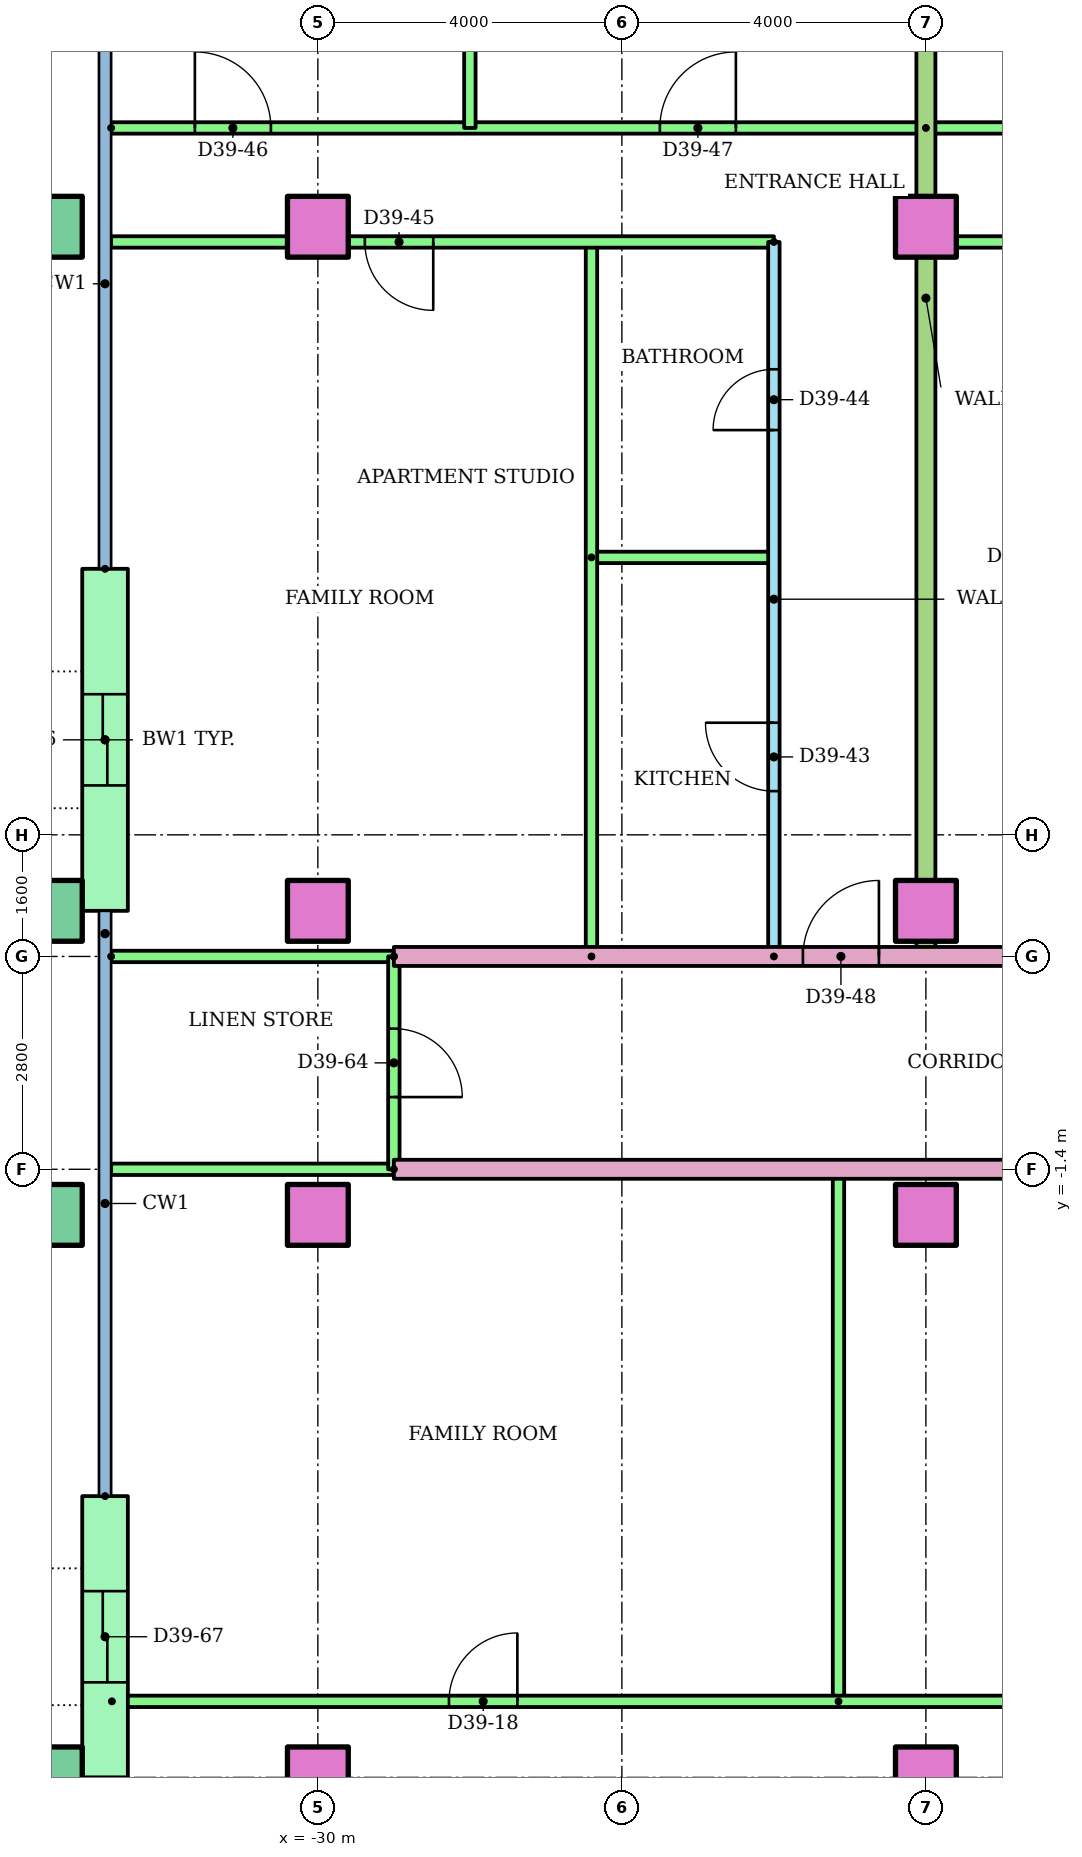
"""IFC4 building model, lengths in metres.
Left out: names, types, materials, properties, quantities, classifications, styles, units other than length and angle.
Written with IfcOpenShell. Run it as: python <this file> out.ifc"""

import sys

from ifc_helpers import new_model, si_unit, direction, frame, frame_2d, origin, origin_2d, place, context, subcontext, project, spatial, rectangle, hollow_rectangle, extrude, element, fill, save


model = new_model("IFC4")
c1 = context("Model", 3, precision=1e-05, world=origin(), true_north=direction((0.0, 1.0)))
c2 = subcontext(c1, "Body", "Model", "MODEL_VIEW")
j1 = project(units=[si_unit("LENGTHUNIT", "METRE"), si_unit("PLANEANGLEUNIT", "RADIAN")], contexts=[c1])
p1 = place(None, origin())
s1 = spatial("IfcSite", under=j1, at=p1, CompositionType="ELEMENT")
p2 = place(p1, origin())
s2 = spatial("IfcBuilding", under=s1, at=p2, CompositionType="ELEMENT")
p3 = place(p2, frame((0.0, 0.0, 148.6)))
s3 = spatial("IfcBuildingStorey", under=s2, at=p3, CompositionType="ELEMENT", Elevation=148.6)
p4 = place(p3, frame((-33.5, -9.4, 0.0)))
e1 = element("IfcColumn", 1, at=p4, inside=s3, PredefinedType="COLUMN", context=c2, shape_type="SweptSolid", body=[
    extrude(hollow_rectangle(XDim=0.8, YDim=0.8, WallThickness=0.04, at=origin_2d()), origin(), (0.0, 0.0, 1.0), 3.2),
])
for number, where in (
    (2, (-30.0, -9.4, 0.0)),
    (3, (-22.0, -9.4, 0.0)),
):
    element("IfcColumn", number, at=place(p3, frame(where)), inside=s3, PredefinedType="COLUMN", context=c2, shape_type="SweptSolid", body=[
        extrude(rectangle(XDim=0.8, YDim=0.8, at=origin_2d()), origin(), (0.0, 0.0, 1.0), 3.2),
    ])
p5 = place(p3, frame((-33.5, -2.0, 0.0)))
e4 = element("IfcColumn", 4, at=p5, inside=s3, PredefinedType="COLUMN", context=c2, shape_type="SweptSolid", body=[
    extrude(hollow_rectangle(XDim=0.8, YDim=0.8, WallThickness=0.04, at=origin_2d()), origin(), (0.0, 0.0, 1.0), 3.2),
])
for number, where in (
    (5, (-30.0, -2.0, 0.0)),
    (6, (-22.0, -2.0, 0.0)),
):
    element("IfcColumn", number, at=place(p3, frame(where)), inside=s3, PredefinedType="COLUMN", context=c2, shape_type="SweptSolid", body=[
        extrude(rectangle(XDim=0.8, YDim=0.8, at=origin_2d()), origin(), (0.0, 0.0, 1.0), 3.2),
    ])
p6 = place(p3, frame((-33.5, 2.0, 0.0)))
e7 = element("IfcColumn", 7, at=p6, inside=s3, PredefinedType="COLUMN", context=c2, shape_type="SweptSolid", body=[
    extrude(hollow_rectangle(XDim=0.8, YDim=0.8, WallThickness=0.04, at=origin_2d()), origin(), (0.0, 0.0, 1.0), 3.2),
])
for number, where in (
    (8, (-30.0, 2.0, 0.0)),
    (9, (-22.0, 2.0, 0.0)),
):
    element("IfcColumn", number, at=place(p3, frame(where)), inside=s3, PredefinedType="COLUMN", context=c2, shape_type="SweptSolid", body=[
        extrude(rectangle(XDim=0.8, YDim=0.8, at=origin_2d()), origin(), (0.0, 0.0, 1.0), 3.2),
    ])
p7 = place(p3, frame((-33.5, 11.0, 0.0)))
e10 = element("IfcColumn", 10, at=p7, inside=s3, PredefinedType="COLUMN", context=c2, shape_type="SweptSolid", body=[
    extrude(hollow_rectangle(XDim=0.8, YDim=0.8, WallThickness=0.04, at=origin_2d()), origin(), (0.0, 0.0, 1.0), 3.2),
])
for number, where in (
    (11, (-30.0, 11.0, 0.0)),
    (12, (-22.0, 11.0, 0.0)),
):
    element("IfcColumn", number, at=place(p3, frame(where)), inside=s3, PredefinedType="COLUMN", context=c2, shape_type="SweptSolid", body=[
        extrude(rectangle(XDim=0.8, YDim=0.8, at=origin_2d()), origin(), (0.0, 0.0, 1.0), 3.2),
    ])
p8 = place(p3, frame((-32.8, 6.5, 0.0), z_axis=(0.0, 0.0, 1.0), x_axis=(0.0, -1.0, 0.0)))
e13 = element("IfcWall", 13, at=p8, inside=s3, PredefinedType="STANDARD", context=c2, shape_type="SweptSolid", body=[
    extrude(rectangle(XDim=4.5, YDim=0.6, at=frame_2d((2.25, 0.0))), origin(), (0.0, 0.0, 1.0), 2.8),
])
p9 = place(p8, frame((1.65, 0.0, 0.0)))
e14 = element("IfcOpeningElement", 14, at=p9, cuts=e13, PredefinedType="OPENING", context=c2, shape_type="SweptSolid", body=[
    extrude(rectangle(XDim=1.2, YDim=2.1, at=frame_2d((0.6, 1.05))), frame((0.0, 0.31, 0.0), z_axis=(0.0, -1.0, 0.0), x_axis=(1.0, 0.0, 0.0)), (0.0, 0.0, 1.0), 0.62),
])
p10 = place(p3, frame((-32.8, -5.7, 0.0), z_axis=(0.0, 0.0, 1.0), x_axis=(0.0, -1.0, 0.0)))
e15 = element("IfcWall", 15, at=p10, inside=s3, PredefinedType="STANDARD", context=c2, shape_type="SweptSolid", body=[
    extrude(rectangle(XDim=3.7, YDim=0.6, at=frame_2d((1.85, 0.0))), origin(), (0.0, 0.0, 1.0), 2.8),
])
p11 = place(p10, frame((1.25, 0.0, 0.0)))
e16 = element("IfcOpeningElement", 16, at=p11, cuts=e15, PredefinedType="OPENING", context=c2, shape_type="SweptSolid", body=[
    extrude(rectangle(XDim=1.2, YDim=2.1, at=frame_2d((0.6, 1.05))), frame((0.0, 0.31, 0.0), z_axis=(0.0, -1.0, 0.0), x_axis=(1.0, 0.0, 0.0)), (0.0, 0.0, 1.0), 0.62),
])
p12 = place(p3, frame((-23.15, -8.4, 0.0), z_axis=(0.0, 0.0, 1.0), x_axis=(0.0, 1.0, 0.0)))
e17 = element("IfcWall", 17, at=p12, inside=s3, PredefinedType="PARTITIONING", context=c2, shape_type="SweptSolid", body=[
    extrude(rectangle(XDim=7.0, YDim=0.15, at=frame_2d((3.5, 0.0))), origin(), (0.0, 0.0, 1.0), 2.4),
])
p13 = place(p3, frame((-32.71, -8.4, 0.0)))
e18 = element("IfcWall", 18, at=p13, inside=s3, PredefinedType="PARTITIONING", context=c2, shape_type="SweptSolid", body=[
    extrude(rectangle(XDim=24.71, YDim=0.15, at=frame_2d((12.355, 0.0))), origin(), (0.0, 0.0, 1.0), 2.4),
])
p14 = place(p13, frame((19.328, 0.0, 0.0)))
e19 = element("IfcOpeningElement", 19, at=p14, cuts=e18, PredefinedType="OPENING", context=c2, shape_type="SweptSolid", body=[
    extrude(rectangle(XDim=0.9, YDim=2.1, at=frame_2d((0.45, 1.05))), frame((0.0, 0.085, 0.0), z_axis=(0.0, -1.0, 0.0), x_axis=(1.0, 0.0, 0.0)), (0.0, 0.0, 1.0), 0.17),
])
p15 = place(p13, frame((12.735, 0.0, 0.0)))
e20 = element("IfcOpeningElement", 20, at=p15, cuts=e18, PredefinedType="OPENING", context=c2, shape_type="SweptSolid", body=[
    extrude(rectangle(XDim=0.9, YDim=2.1, at=frame_2d((0.45, 1.05))), frame((0.0, 0.085, 0.0), z_axis=(0.0, -1.0, 0.0), x_axis=(1.0, 0.0, 0.0)), (0.0, 0.0, 1.0), 0.17),
])
p16 = place(p13, frame((4.435, 0.0, 0.0)))
e21 = element("IfcOpeningElement", 21, at=p16, cuts=e18, PredefinedType="OPENING", context=c2, shape_type="SweptSolid", body=[
    extrude(rectangle(XDim=0.9, YDim=2.1, at=frame_2d((0.45, 1.05))), frame((0.0, 0.085, 0.0), z_axis=(0.0, -1.0, 0.0), x_axis=(1.0, 0.0, 0.0)), (0.0, 0.0, 1.0), 0.17),
])
p17 = place(p3, frame((-14.0, -1.4, 0.0), z_axis=(0.0, 0.0, 1.0), x_axis=(-1.0, 0.0, 0.0)))
e22 = element("IfcWall", 22, at=p17, inside=s3, PredefinedType="PARTITIONING", context=c2, shape_type="SweptSolid", body=[
    extrude(rectangle(XDim=15.0, YDim=0.25, at=frame_2d((7.5, 0.0))), origin(), (0.0, 0.0, 1.0), 2.4),
])
p18 = place(p3, frame((-29.0, -1.4, 0.0), z_axis=(0.0, 0.0, 1.0), x_axis=(-1.0, 0.0, 0.0)))
e23 = element("IfcWall", 23, at=p18, inside=s3, PredefinedType="PARTITIONING", context=c2, shape_type="SweptSolid", body=[
    extrude(rectangle(XDim=3.72, YDim=0.15, at=frame_2d((1.86, 0.0))), origin(), (0.0, 0.0, 1.0), 2.4),
])
p19 = place(p3, frame((-24.0, 1.4, 0.0), z_axis=(0.0, 0.0, 1.0), x_axis=(0.0, 1.0, 0.0)))
e24 = element("IfcWall", 24, at=p19, inside=s3, PredefinedType="PARTITIONING", context=c2, shape_type="SweptSolid", body=[
    extrude(rectangle(XDim=9.4, YDim=0.15, at=frame_2d((4.7, 0.0))), origin(), (0.0, 0.0, 1.0), 2.4),
])
p20 = place(p19, frame((2.175, 0.0, 0.0)))
e25 = element("IfcOpeningElement", 25, at=p20, cuts=e24, PredefinedType="OPENING", context=c2, shape_type="SweptSolid", body=[
    extrude(rectangle(XDim=0.9, YDim=2.1, at=frame_2d((0.45, 1.05))), frame((0.0, 0.085, 0.0), z_axis=(0.0, -1.0, 0.0), x_axis=(1.0, 0.0, 0.0)), (0.0, 0.0, 1.0), 0.17),
])
p21 = place(p19, frame((6.925, 0.0, 0.0)))
e26 = element("IfcOpeningElement", 26, at=p21, cuts=e24, PredefinedType="OPENING", context=c2, shape_type="SweptSolid", body=[
    extrude(rectangle(XDim=0.8, YDim=2.1, at=frame_2d((0.4, 1.05))), frame((0.0, 0.085, 0.0), z_axis=(0.0, -1.0, 0.0), x_axis=(1.0, 0.0, 0.0)), (0.0, 0.0, 1.0), 0.17),
])
p22 = place(p3, frame((-26.4, 6.65, 0.0)))
e27 = element("IfcWall", 27, at=p22, inside=s3, PredefinedType="PARTITIONING", context=c2, shape_type="SweptSolid", body=[
    extrude(rectangle(XDim=2.4, YDim=0.15, at=frame_2d((1.2, 0.0))), origin(), (0.0, 0.0, 1.0), 2.4),
])
p23 = place(p3, frame((-26.4, 1.4, 0.0), z_axis=(0.0, 0.0, 1.0), x_axis=(0.0, 1.0, 0.0)))
e28 = element("IfcWall", 28, at=p23, inside=s3, PredefinedType="PARTITIONING", context=c2, shape_type="SweptSolid", body=[
    extrude(rectangle(XDim=9.4, YDim=0.15, at=frame_2d((4.7, 0.0))), origin(), (0.0, 0.0, 1.0), 2.4),
])
p24 = place(p3, frame((-24.0, 10.8, 0.0), z_axis=(0.0, 0.0, 1.0), x_axis=(-1.0, 0.0, 0.0)))
e29 = element("IfcWall", 29, at=p24, inside=s3, PredefinedType="PARTITIONING", context=c2, shape_type="SweptSolid", body=[
    extrude(rectangle(XDim=8.72, YDim=0.15, at=frame_2d((4.36, 0.0))), origin(), (0.0, 0.0, 1.0), 2.4),
])
p25 = place(p24, frame((4.482, 0.0, 0.0)))
e30 = element("IfcOpeningElement", 30, at=p25, cuts=e29, PredefinedType="OPENING", context=c2, shape_type="SweptSolid", body=[
    extrude(rectangle(XDim=0.9, YDim=2.1, at=frame_2d((0.45, 1.05))), frame((0.0, 0.085, 0.0), z_axis=(0.0, -1.0, 0.0), x_axis=(1.0, 0.0, 0.0)), (0.0, 0.0, 1.0), 0.17),
])
p26 = place(p3, frame((-32.72, 12.3, 0.0)))
e31 = element("IfcWall", 31, at=p26, inside=s3, PredefinedType="PARTITIONING", context=c2, shape_type="SweptSolid", body=[
    extrude(rectangle(XDim=10.72, YDim=0.15, at=frame_2d((5.36, 0.0))), origin(), (0.0, 0.0, 1.0), 2.4),
])
p27 = place(p26, frame((1.102, 0.0, 0.0)))
e32 = element("IfcOpeningElement", 32, at=p27, cuts=e31, PredefinedType="OPENING", context=c2, shape_type="SweptSolid", body=[
    extrude(rectangle(XDim=1.0, YDim=2.1, at=frame_2d((0.5, 1.05))), frame((0.0, 0.085, 0.0), z_axis=(0.0, -1.0, 0.0), x_axis=(1.0, 0.0, 0.0)), (0.0, 0.0, 1.0), 0.17),
])
p28 = place(p26, frame((7.22, 0.0, 0.0)))
e33 = element("IfcOpeningElement", 33, at=p28, cuts=e31, PredefinedType="OPENING", context=c2, shape_type="SweptSolid", body=[
    extrude(rectangle(XDim=1.0, YDim=2.1, at=frame_2d((0.5, 1.05))), frame((0.0, 0.085, 0.0), z_axis=(0.0, -1.0, 0.0), x_axis=(1.0, 0.0, 0.0)), (0.0, 0.0, 1.0), 0.17),
])
p29 = place(p3, frame((-28.0, 16.92, 0.0), z_axis=(0.0, 0.0, 1.0), x_axis=(0.0, -1.0, 0.0)))
e34 = element("IfcWall", 34, at=p29, inside=s3, PredefinedType="PARTITIONING", context=c2, shape_type="SweptSolid", body=[
    extrude(rectangle(XDim=4.62, YDim=0.15, at=frame_2d((2.31, 0.0))), origin(), (0.0, 0.0, 1.0), 2.4),
])
p30 = place(p3, frame((-16.0, 10.8, 0.0), z_axis=(0.0, 0.0, 1.0), x_axis=(-1.0, 0.0, 0.0)))
e35 = element("IfcWall", 35, at=p30, inside=s3, PredefinedType="PARTITIONING", context=c2, shape_type="SweptSolid", body=[
    extrude(rectangle(XDim=6.0, YDim=0.15, at=frame_2d((3.0, 0.0))), origin(), (0.0, 0.0, 1.0), 2.4),
])
p31 = place(p30, frame((3.75, 0.0, 0.0)))
e36 = element("IfcOpeningElement", 36, at=p31, cuts=e35, PredefinedType="OPENING", context=c2, shape_type="SweptSolid", body=[
    extrude(rectangle(XDim=0.9, YDim=2.1, at=frame_2d((0.45, 1.05))), frame((0.0, 0.085, 0.0), z_axis=(0.0, -1.0, 0.0), x_axis=(1.0, 0.0, 0.0)), (0.0, 0.0, 1.0), 0.17),
])
p32 = place(p3, frame((-22.0, 12.3, 0.0)))
e37 = element("IfcWall", 37, at=p32, inside=s3, PredefinedType="PARTITIONING", context=c2, shape_type="SweptSolid", body=[
    extrude(rectangle(XDim=8.0, YDim=0.15, at=frame_2d((4.0, 0.0))), origin(), (0.0, 0.0, 1.0), 2.4),
])
p33 = place(p32, frame((3.5, 0.0, 0.0)))
e38 = element("IfcOpeningElement", 38, at=p33, cuts=e37, PredefinedType="OPENING", context=c2, shape_type="SweptSolid", body=[
    extrude(rectangle(XDim=1.0, YDim=2.1, at=frame_2d((0.5, 1.05))), frame((0.0, 0.085, 0.0), z_axis=(0.0, -1.0, 0.0), x_axis=(1.0, 0.0, 0.0)), (0.0, 0.0, 1.0), 0.17),
])
p34 = place(p3, frame((-22.0, 18.721, 0.0), z_axis=(0.0, 0.0, 1.0), x_axis=(0.0, -1.0, 0.0)))
e39 = element("IfcWall", 39, at=p34, inside=s3, PredefinedType="PARTITIONING", context=c2, shape_type="SweptSolid", body=[
    extrude(rectangle(XDim=17.321, YDim=0.25, at=frame_2d((8.661, 0.0))), origin(), (0.0, 0.0, 1.0), 2.4),
])
p35 = place(p3, frame((-29.0, 1.4, 0.0)))
e40 = element("IfcWall", 40, at=p35, inside=s3, PredefinedType="PARTITIONING", context=c2, shape_type="SweptSolid", body=[
    extrude(rectangle(XDim=15.0, YDim=0.25, at=frame_2d((7.5, 0.0))), origin(), (0.0, 0.0, 1.0), 2.4),
])
p36 = place(p35, frame((5.382, 0.0, 0.0)))
e41 = element("IfcOpeningElement", 41, at=p36, cuts=e40, PredefinedType="OPENING", context=c2, shape_type="SweptSolid", body=[
    extrude(rectangle(XDim=1.0, YDim=2.1, at=frame_2d((0.5, 1.05))), frame((0.0, 0.135, 0.0), z_axis=(0.0, -1.0, 0.0), x_axis=(1.0, 0.0, 0.0)), (0.0, 0.0, 1.0), 0.27),
])
p37 = place(p35, frame((13.5, 0.0, 0.0)))
e42 = element("IfcOpeningElement", 42, at=p37, cuts=e40, PredefinedType="OPENING", context=c2, shape_type="SweptSolid", body=[
    extrude(rectangle(XDim=1.0, YDim=2.1, at=frame_2d((0.5, 1.05))), frame((0.0, 0.135, 0.0), z_axis=(0.0, -1.0, 0.0), x_axis=(1.0, 0.0, 0.0)), (0.0, 0.0, 1.0), 0.27),
])
p38 = place(p3, frame((-32.72, 1.4, 0.0)))
e43 = element("IfcWall", 43, at=p38, inside=s3, PredefinedType="PARTITIONING", context=c2, shape_type="SweptSolid", body=[
    extrude(rectangle(XDim=3.72, YDim=0.15, at=frame_2d((1.86, 0.0))), origin(), (0.0, 0.0, 1.0), 2.4),
])
p39 = place(p3, frame((-29.0, 1.4, 0.0), z_axis=(0.0, 0.0, 1.0), x_axis=(0.0, -1.0, 0.0)))
e44 = element("IfcWall", 44, at=p39, inside=s3, PredefinedType="PARTITIONING", context=c2, shape_type="SweptSolid", body=[
    extrude(rectangle(XDim=2.8, YDim=0.15, at=frame_2d((1.4, 0.0))), origin(), (0.0, 0.0, 1.0), 2.4),
])
p40 = place(p39, frame((0.95, 0.0, 0.0)))
e45 = element("IfcOpeningElement", 45, at=p40, cuts=e44, PredefinedType="OPENING", context=c2, shape_type="SweptSolid", body=[
    extrude(rectangle(XDim=0.9, YDim=2.1, at=frame_2d((0.45, 1.05))), frame((0.0, 0.085, 0.0), z_axis=(0.0, -1.0, 0.0), x_axis=(1.0, 0.0, 0.0)), (0.0, 0.0, 1.0), 0.17),
])
p41 = place(p16, origin())
e46 = element("IfcDoor", 46, at=p41, inside=s3, OperationType="SINGLE_SWING_RIGHT", PredefinedType="DOOR", context=c2, shape_type="SweptSolid", body=[
    extrude(rectangle(XDim=0.9, YDim=2.1, at=frame_2d((0.45, 1.05))), frame((0.0, 0.025, 0.0), z_axis=(0.0, -1.0, 0.0), x_axis=(1.0, 0.0, 0.0)), (0.0, 0.0, 1.0), 0.05),
])
fill(e21, e46)
p42 = place(p20, origin())
e47 = element("IfcDoor", 47, at=p42, inside=s3, OperationType="SINGLE_SWING_RIGHT", PredefinedType="DOOR", context=c2, shape_type="SweptSolid", body=[
    extrude(rectangle(XDim=0.9, YDim=2.1, at=frame_2d((0.45, 1.05))), frame((0.0, 0.025, 0.0), z_axis=(0.0, -1.0, 0.0), x_axis=(1.0, 0.0, 0.0)), (0.0, 0.0, 1.0), 0.05),
])
fill(e25, e47)
p43 = place(p21, origin())
e48 = element("IfcDoor", 48, at=p43, inside=s3, OperationType="SINGLE_SWING_LEFT", PredefinedType="DOOR", context=c2, shape_type="SweptSolid", body=[
    extrude(rectangle(XDim=0.8, YDim=2.1, at=frame_2d((0.4, 1.05))), frame((0.0, 0.025, 0.0), z_axis=(0.0, -1.0, 0.0), x_axis=(1.0, 0.0, 0.0)), (0.0, 0.0, 1.0), 0.05),
])
fill(e26, e48)
p44 = place(p25, origin())
e49 = element("IfcDoor", 49, at=p44, inside=s3, OperationType="SINGLE_SWING_LEFT", PredefinedType="DOOR", context=c2, shape_type="SweptSolid", body=[
    extrude(rectangle(XDim=0.9, YDim=2.1, at=frame_2d((0.45, 1.05))), frame((0.0, 0.025, 0.0), z_axis=(0.0, -1.0, 0.0), x_axis=(1.0, 0.0, 0.0)), (0.0, 0.0, 1.0), 0.05),
])
fill(e30, e49)
p45 = place(p27, origin())
e50 = element("IfcDoor", 50, at=p45, inside=s3, OperationType="SINGLE_SWING_LEFT", PredefinedType="DOOR", context=c2, shape_type="SweptSolid", body=[
    extrude(rectangle(XDim=1.0, YDim=2.1, at=frame_2d((0.5, 1.05))), frame((0.0, 0.025, 0.0), z_axis=(0.0, -1.0, 0.0), x_axis=(1.0, 0.0, 0.0)), (0.0, 0.0, 1.0), 0.05),
])
fill(e32, e50)
p46 = place(p28, origin())
e51 = element("IfcDoor", 51, at=p46, inside=s3, OperationType="SINGLE_SWING_RIGHT", PredefinedType="DOOR", context=c2, shape_type="SweptSolid", body=[
    extrude(rectangle(XDim=1.0, YDim=2.1, at=frame_2d((0.5, 1.05))), frame((0.0, 0.025, 0.0), z_axis=(0.0, -1.0, 0.0), x_axis=(1.0, 0.0, 0.0)), (0.0, 0.0, 1.0), 0.05),
])
fill(e33, e51)
p47 = place(p36, origin())
e52 = element("IfcDoor", 52, at=p47, inside=s3, OperationType="SINGLE_SWING_RIGHT", PredefinedType="DOOR", context=c2, shape_type="SweptSolid", body=[
    extrude(rectangle(XDim=1.0, YDim=2.1, at=frame_2d((0.5, 1.05))), frame((0.0, 0.025, 0.0), z_axis=(0.0, -1.0, 0.0), x_axis=(1.0, 0.0, 0.0)), (0.0, 0.0, 1.0), 0.05),
])
fill(e41, e52)
p48 = place(p40, origin())
e53 = element("IfcDoor", 53, at=p48, inside=s3, OperationType="SINGLE_SWING_RIGHT", PredefinedType="DOOR", context=c2, shape_type="SweptSolid", body=[
    extrude(rectangle(XDim=0.9, YDim=2.1, at=frame_2d((0.45, 1.05))), frame((0.0, 0.025, 0.0), z_axis=(0.0, -1.0, 0.0), x_axis=(1.0, 0.0, 0.0)), (0.0, 0.0, 1.0), 0.05),
])
fill(e45, e53)
p49 = place(p9, origin())
e54 = element("IfcDoor", 54, at=p49, inside=s3, OperationType="SLIDING_TO_LEFT", PredefinedType="DOOR", context=c2, shape_type="SweptSolid", body=[
    extrude(rectangle(XDim=1.2, YDim=2.1, at=frame_2d((0.6, 1.05))), frame((0.0, 0.025, 0.0), z_axis=(0.0, -1.0, 0.0), x_axis=(1.0, 0.0, 0.0)), (0.0, 0.0, 1.0), 0.05),
])
fill(e14, e54)
p50 = place(p11, origin())
e55 = element("IfcDoor", 55, at=p50, inside=s3, OperationType="SLIDING_TO_LEFT", PredefinedType="DOOR", context=c2, shape_type="SweptSolid", body=[
    extrude(rectangle(XDim=1.2, YDim=2.1, at=frame_2d((0.6, 1.05))), frame((0.0, 0.025, 0.0), z_axis=(0.0, -1.0, 0.0), x_axis=(1.0, 0.0, 0.0)), (0.0, 0.0, 1.0), 0.05),
])
fill(e16, e55)
save(model, sys.argv[1])
